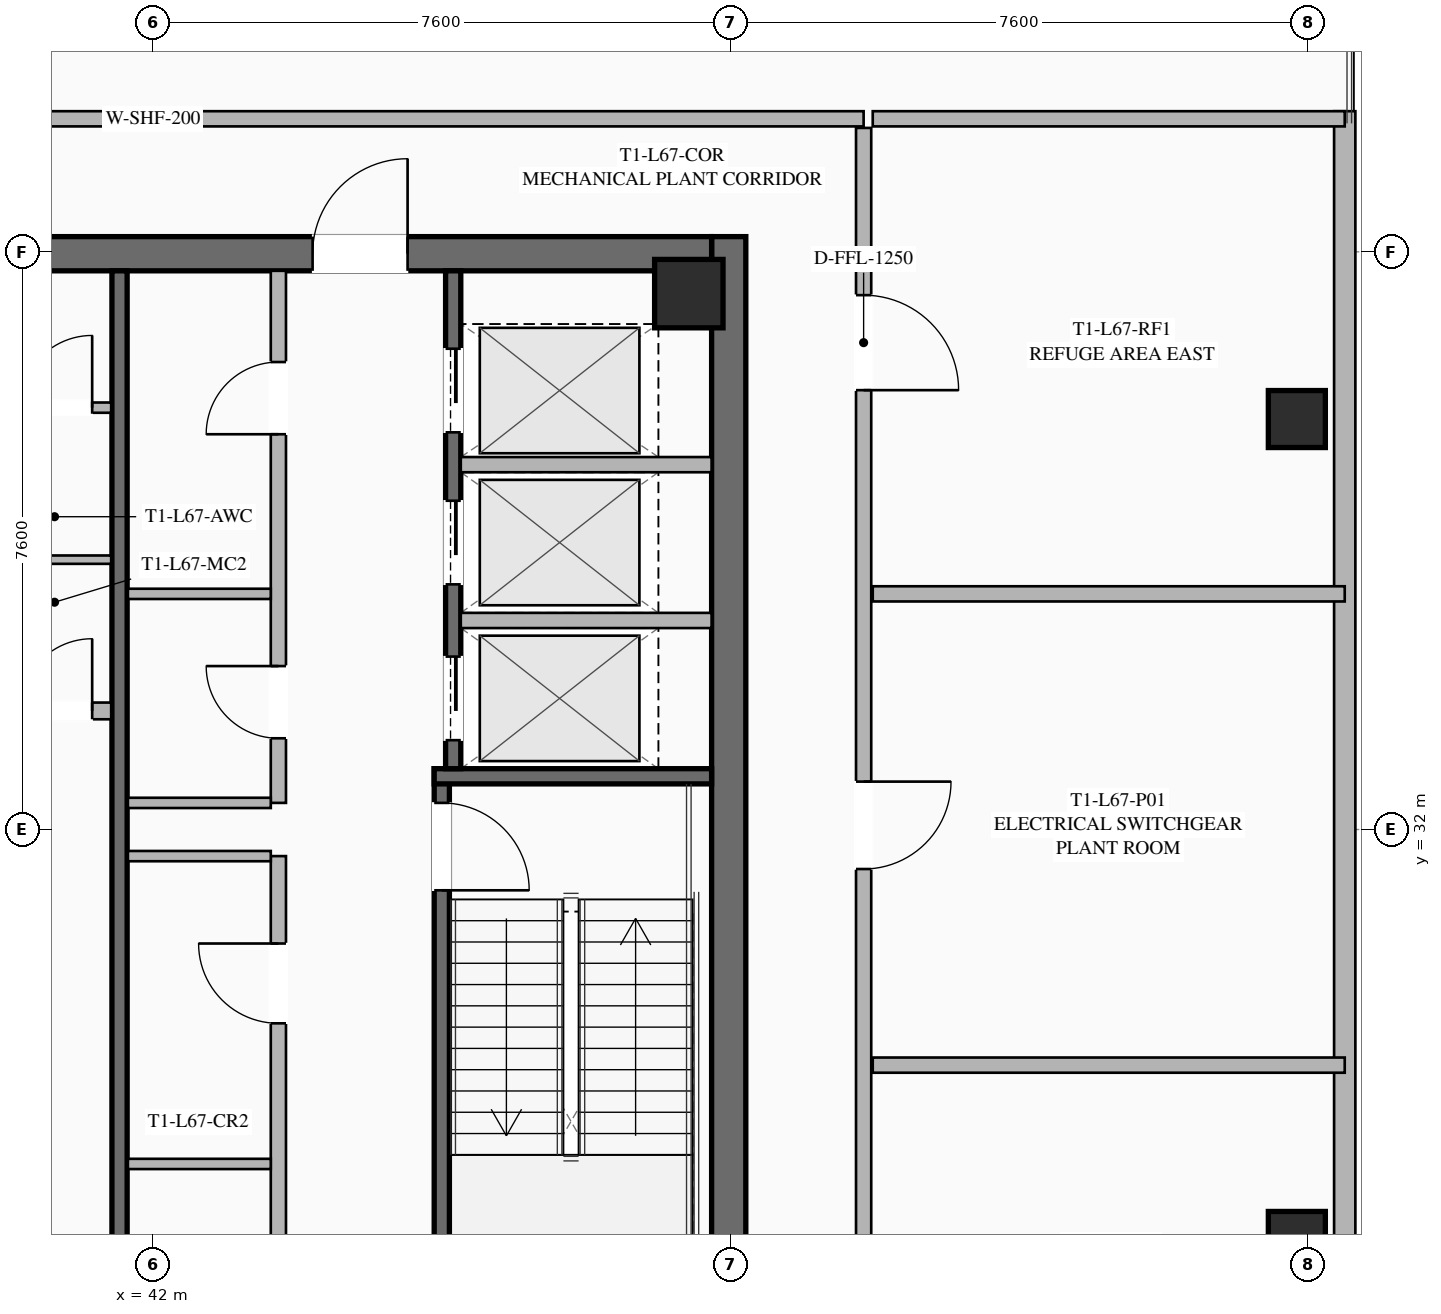
"""IFC4 building model, lengths in metres.
Left out: names, types, materials, properties, quantities, classifications, styles, units other than length and angle.
Written with IfcOpenShell. Run it as: python <this file> out.ifc"""

import sys

from ifc_helpers import new_model, si_unit, direction, frame, frame_2d, origin, origin_2d, place, context, subcontext, project, spatial, rectangle, hollow_rectangle, extrude, element, fill, save


model = new_model("IFC4")
c1 = context("Model", 3, precision=1e-05, world=origin(), true_north=direction((0.0, 1.0)))
c2 = subcontext(c1, "Body", "Model", "MODEL_VIEW")
j1 = project(units=[si_unit("LENGTHUNIT", "METRE"), si_unit("PLANEANGLEUNIT", "RADIAN")], contexts=[c1])
p1 = place(None, origin())
s1 = spatial("IfcSite", under=j1, at=p1, CompositionType="ELEMENT")
p2 = place(p1, origin())
s2 = spatial("IfcBuilding", under=s1, at=p2, CompositionType="ELEMENT")
p3 = place(p2, frame((0.0, 0.0, 246.8)))
s3 = spatial("IfcBuildingStorey", under=s2, at=p3, CompositionType="ELEMENT", Elevation=246.8)
p4 = place(p3, frame((49.575, 39.8, 0.0), z_axis=(0.0, 0.0, 1.0), x_axis=(0.0, -1.0, 0.0)))
e1 = element("IfcWall", 1, at=p4, inside=s3, PredefinedType="SHEAR", context=c2, shape_type="SweptSolid", body=[
    extrude(rectangle(XDim=15.6, YDim=0.45, at=frame_2d((7.8, 0.0))), origin(), (0.0, 0.0, 1.0), 4.6),
])
p5 = place(p3, frame((34.65, 39.575, 0.0), z_axis=(0.0, 0.0, 1.0), x_axis=(1.0, 0.0, 0.0)))
e2 = element("IfcWall", 2, at=p5, inside=s3, PredefinedType="SHEAR", context=c2, shape_type="SweptSolid", body=[
    extrude(rectangle(XDim=14.7, YDim=0.45, at=frame_2d((7.35, 0.0))), origin(), (0.0, 0.0, 1.0), 4.6),
])
p6 = place(p5, frame((4.4, 0.0, 0.0)))
e3 = element("IfcOpeningElement", 3, at=p6, cuts=e2, PredefinedType="OPENING", context=c2, shape_type="SweptSolid", body=[
    extrude(rectangle(XDim=1.25, YDim=2.25, at=frame_2d((0.625, 1.125))), frame((0.0, 0.235, 0.0), z_axis=(0.0, -1.0, 0.0), x_axis=(1.0, 0.0, 0.0)), (0.0, 0.0, 1.0), 0.47),
])
p7 = place(p5, frame((9.45, 0.0, 0.0)))
e4 = element("IfcOpeningElement", 4, at=p7, cuts=e2, PredefinedType="OPENING", context=c2, shape_type="SweptSolid", body=[
    extrude(rectangle(XDim=1.25, YDim=2.25, at=frame_2d((0.625, 1.125))), frame((0.0, 0.235, 0.0), z_axis=(0.0, -1.0, 0.0), x_axis=(1.0, 0.0, 0.0)), (0.0, 0.0, 1.0), 0.47),
])
p8 = place(p3, frame((49.05, 39.05, 0.0), z_axis=(0.0, 0.0, 1.0), x_axis=(1.0, 0.0, 0.0)))
e5 = element("IfcColumn", 5, at=p8, inside=s3, PredefinedType="COLUMN", context=c2, shape_type="SweptSolid", body=[
    extrude(hollow_rectangle(XDim=0.9, YDim=0.9, WallThickness=0.04, at=origin_2d()), origin(), (0.0, 0.0, 1.0), 4.38),
])
for number, where, z_axis, x_axis in (
    (6, (57.05, 26.6, 0.0), (0.0, 0.0, 1.0), (1.0, 0.0, 0.0)),
    (7, (57.05, 37.4, 0.0), (0.0, 0.0, 1.0), (1.0, 0.0, 0.0)),
):
    element("IfcColumn", number, at=place(p3, frame(where, z_axis=z_axis, x_axis=x_axis)), inside=s3, PredefinedType="COLUMN", context=c2, shape_type="SweptSolid", body=[
        extrude(hollow_rectangle(XDim=0.75, YDim=0.75, WallThickness=0.032, at=origin_2d()), origin(), (0.0, 0.0, 1.0), 4.38),
    ])
p9 = place(p3, frame((57.68, 41.45, 0.0), z_axis=(0.0, 0.0, 1.0), x_axis=(0.0, -1.0, 0.0)))
e8 = element("IfcWall", 8, at=p9, inside=s3, PredefinedType="SOLIDWALL", context=c2, shape_type="SweptSolid", body=[
    extrude(rectangle(XDim=18.9, YDim=0.28, at=frame_2d((9.45, 0.0))), origin(), (0.0, 0.0, 1.0), 4.38),
])
p10 = place(p3, frame((45.8, 32.8, 0.0), z_axis=(0.0, 0.0, 1.0), x_axis=(0.0, -1.0, 0.0)))
e9 = element("IfcWall", 9, at=p10, inside=s3, PredefinedType="SHEAR", context=c2, shape_type="SweptSolid", body=[
    extrude(rectangle(XDim=8.15, YDim=0.2, at=frame_2d((4.075, 0.0))), origin(), (0.0, 0.0, 1.0), 4.38),
])
p11 = place(p10, frame((0.45, 0.0, 0.0)))
e10 = element("IfcOpeningElement", 10, at=p11, cuts=e9, PredefinedType="OPENING", context=c2, shape_type="SweptSolid", body=[
    extrude(rectangle(XDim=1.15, YDim=2.2, at=frame_2d((0.575, 1.1))), frame((0.0, 0.11, 0.0), z_axis=(0.0, -1.0, 0.0), x_axis=(1.0, 0.0, 0.0)), (0.0, 0.0, 1.0), 0.22),
])
p12 = place(p3, frame((45.7, 32.7, 0.0), z_axis=(0.0, 0.0, 1.0), x_axis=(1.0, 0.0, 0.0)))
e11 = element("IfcWall", 11, at=p12, inside=s3, PredefinedType="SHEAR", context=c2, shape_type="SweptSolid", body=[
    extrude(rectangle(XDim=3.65, YDim=0.2, at=frame_2d((1.825, 0.0))), origin(), (0.0, 0.0, 1.0), 4.38),
])
p13 = place(p3, frame((41.56, 24.65, 0.0), z_axis=(0.0, 0.0, 1.0), x_axis=(0.0, 1.0, 0.0)))
e12 = element("IfcWall", 12, at=p13, inside=s3, PredefinedType="SHEAR", context=c2, shape_type="SweptSolid", body=[
    extrude(rectangle(XDim=14.7, YDim=0.2, at=frame_2d((7.35, 0.0))), origin(), (0.0, 0.0, 1.0), 4.38),
])
p14 = place(p3, frame((38.3, 33.56, 0.0), z_axis=(0.0, 0.0, 1.0), x_axis=(1.0, 0.0, 0.0)))
e13 = element("IfcWall", 13, at=p14, inside=s3, PredefinedType="SOLIDWALL", context=c2, shape_type="SweptSolid", body=[
    extrude(rectangle(XDim=3.15, YDim=0.22, at=frame_2d((1.575, 0.0))), origin(), (0.0, 0.0, 1.0), 3.491),
])
p15 = place(p14, frame((0.25, 0.0, 0.0)))
e14 = element("IfcOpeningElement", 14, at=p15, cuts=e13, PredefinedType="OPENING", context=c2, shape_type="SweptSolid", body=[
    extrude(rectangle(XDim=0.95, YDim=2.05, at=frame_2d((0.475, 1.025))), frame((0.0, 0.12, 0.0), z_axis=(0.0, -1.0, 0.0), x_axis=(1.0, 0.0, 0.0)), (0.0, 0.0, 1.0), 0.24),
])
p16 = place(p14, frame((1.95, 0.0, 0.0)))
e15 = element("IfcOpeningElement", 15, at=p16, cuts=e13, PredefinedType="OPENING", context=c2, shape_type="SweptSolid", body=[
    extrude(rectangle(XDim=0.95, YDim=2.05, at=frame_2d((0.475, 1.025))), frame((0.0, 0.12, 0.0), z_axis=(0.0, -1.0, 0.0), x_axis=(1.0, 0.0, 0.0)), (0.0, 0.0, 1.0), 0.24),
])
p17 = place(p3, frame((45.95, 39.35, 0.0), z_axis=(0.0, 0.0, 1.0), x_axis=(0.0, -1.0, 0.0)))
e16 = element("IfcWall", 16, at=p17, inside=s3, PredefinedType="SHEAR", context=c2, shape_type="SweptSolid", body=[
    extrude(rectangle(XDim=6.55, YDim=0.2, at=frame_2d((3.275, 0.0))), origin(), (0.0, 0.0, 1.0), 4.38),
])
p18 = place(p17, frame((5.075, 0.0, 0.0)))
e17 = element("IfcOpeningElement", 17, at=p18, cuts=e16, PredefinedType="OPENING", context=c2, shape_type="SweptSolid", body=[
    extrude(rectangle(XDim=1.1, YDim=2.2, at=frame_2d((0.55, 1.1))), frame((0.0, 0.11, 0.0), z_axis=(0.0, -1.0, 0.0), x_axis=(1.0, 0.0, 0.0)), (0.0, 0.0, 1.0), 0.22),
])
p19 = place(p17, frame((3.025, 0.0, 0.0)))
e18 = element("IfcOpeningElement", 18, at=p19, cuts=e16, PredefinedType="OPENING", context=c2, shape_type="SweptSolid", body=[
    extrude(rectangle(XDim=1.1, YDim=2.2, at=frame_2d((0.55, 1.1))), frame((0.0, 0.11, 0.0), z_axis=(0.0, -1.0, 0.0), x_axis=(1.0, 0.0, 0.0)), (0.0, 0.0, 1.0), 0.22),
])
p20 = place(p17, frame((1.025, 0.0, 0.0)))
e19 = element("IfcOpeningElement", 19, at=p20, cuts=e16, PredefinedType="OPENING", context=c2, shape_type="SweptSolid", body=[
    extrude(rectangle(XDim=1.1, YDim=2.2, at=frame_2d((0.55, 1.1))), frame((0.0, 0.11, 0.0), z_axis=(0.0, -1.0, 0.0), x_axis=(1.0, 0.0, 0.0)), (0.0, 0.0, 1.0), 0.22),
])
for number, where, z_axis, x_axis in (
    (20, (46.05, 34.75, 0.0), (0.0, 0.0, 1.0), (1.0, 0.0, 0.0)),
    (21, (46.05, 36.8, 0.0), (0.0, 0.0, 1.0), (1.0, 0.0, 0.0)),
):
    element("IfcWall", number, at=place(p3, frame(where, z_axis=z_axis, x_axis=x_axis)), inside=s3, PredefinedType="SOLIDWALL", context=c2, shape_type="SweptSolid", body=[
        extrude(rectangle(XDim=3.3, YDim=0.2, at=frame_2d((1.65, 0.0))), origin(), (0.0, 0.0, 1.0), 4.38),
    ])
p21 = place(p3, frame((38.3, 37.55, 0.0), z_axis=(0.0, 0.0, 1.0), x_axis=(1.0, 0.0, 0.0)))
e22 = element("IfcWall", 22, at=p21, inside=s3, PredefinedType="PARTITIONING", context=c2, shape_type="SweptSolid", body=[
    extrude(rectangle(XDim=3.15, YDim=0.135, at=frame_2d((1.575, 0.0))), origin(), (0.0, 0.0, 1.0), 3.491),
])
p22 = place(p21, frame((0.25, 0.0, 0.0)))
e23 = element("IfcOpeningElement", 23, at=p22, cuts=e22, PredefinedType="OPENING", context=c2, shape_type="SweptSolid", body=[
    extrude(rectangle(XDim=0.95, YDim=2.05, at=frame_2d((0.475, 1.025))), frame((0.0, 0.077, 0.0), z_axis=(0.0, -1.0, 0.0), x_axis=(1.0, 0.0, 0.0)), (0.0, 0.0, 1.0), 0.155),
])
p23 = place(p21, frame((1.95, 0.0, 0.0)))
e24 = element("IfcOpeningElement", 24, at=p23, cuts=e22, PredefinedType="OPENING", context=c2, shape_type="SweptSolid", body=[
    extrude(rectangle(XDim=0.95, YDim=2.05, at=frame_2d((0.475, 1.025))), frame((0.0, 0.077, 0.0), z_axis=(0.0, -1.0, 0.0), x_axis=(1.0, 0.0, 0.0)), (0.0, 0.0, 1.0), 0.155),
])
p24 = place(p3, frame((38.3, 35.55, 0.0), z_axis=(0.0, 0.0, 1.0), x_axis=(1.0, 0.0, 0.0)))
e25 = element("IfcWall", 25, at=p24, inside=s3, PredefinedType="PARTITIONING", context=c2, shape_type="SweptSolid", body=[
    extrude(rectangle(XDim=3.15, YDim=0.11, at=frame_2d((1.575, 0.0))), origin(), (0.0, 0.0, 1.0), 3.491),
])
p25 = place(p3, frame((43.65, 24.65, 0.0), z_axis=(0.0, 0.0, 1.0), x_axis=(0.0, 1.0, 0.0)))
e26 = element("IfcWall", 26, at=p25, inside=s3, PredefinedType="SOLIDWALL", context=c2, shape_type="SweptSolid", body=[
    extrude(rectangle(XDim=7.0, YDim=0.2, at=frame_2d((3.5, 0.0))), origin(), (0.0, 0.0, 1.0), 3.491),
])
p26 = place(p25, frame((0.85, 0.0, 0.0)))
e27 = element("IfcOpeningElement", 27, at=p26, cuts=e26, PredefinedType="OPENING", context=c2, shape_type="SweptSolid", body=[
    extrude(rectangle(XDim=0.95, YDim=2.05, at=frame_2d((0.475, 1.025))), frame((0.0, 0.11, 0.0), z_axis=(0.0, -1.0, 0.0), x_axis=(1.0, 0.0, 0.0)), (0.0, 0.0, 1.0), 0.22),
])
p27 = place(p25, frame((4.8, 0.0, 0.0)))
e28 = element("IfcOpeningElement", 28, at=p27, cuts=e26, PredefinedType="OPENING", context=c2, shape_type="SweptSolid", body=[
    extrude(rectangle(XDim=1.05, YDim=2.2, at=frame_2d((0.525, 1.1))), frame((0.0, 0.11, 0.0), z_axis=(0.0, -1.0, 0.0), x_axis=(1.0, 0.0, 0.0)), (0.0, 0.0, 1.0), 0.22),
])
for number, where, z_axis, x_axis in (
    (29, (41.67, 31.65, 0.0), (0.0, 0.0, 1.0), (1.0, 0.0, 0.0)),
    (30, (41.67, 27.6, 0.0), (0.0, 0.0, 1.0), (1.0, 0.0, 0.0)),
):
    element("IfcWall", number, at=place(p3, frame(where, z_axis=z_axis, x_axis=x_axis)), inside=s3, PredefinedType="PARTITIONING", context=c2, shape_type="SweptSolid", body=[
        extrude(rectangle(XDim=1.88, YDim=0.135, at=frame_2d((0.94, 0.0))), origin(), (0.0, 0.0, 1.0), 3.491),
    ])
p28 = place(p3, frame((43.65, 32.35, 0.0), z_axis=(0.0, 0.0, 1.0), x_axis=(0.0, 1.0, 0.0)))
e31 = element("IfcWall", 31, at=p28, inside=s3, PredefinedType="SOLIDWALL", context=c2, shape_type="SweptSolid", body=[
    extrude(rectangle(XDim=7.0, YDim=0.2, at=frame_2d((3.5, 0.0))), origin(), (0.0, 0.0, 1.0), 3.491),
])
p29 = place(p28, frame((0.85, 0.0, 0.0)))
e32 = element("IfcOpeningElement", 32, at=p29, cuts=e31, PredefinedType="OPENING", context=c2, shape_type="SweptSolid", body=[
    extrude(rectangle(XDim=0.95, YDim=2.05, at=frame_2d((0.475, 1.025))), frame((0.0, 0.11, 0.0), z_axis=(0.0, -1.0, 0.0), x_axis=(1.0, 0.0, 0.0)), (0.0, 0.0, 1.0), 0.22),
])
p30 = place(p28, frame((4.85, 0.0, 0.0)))
e33 = element("IfcOpeningElement", 33, at=p30, cuts=e31, PredefinedType="OPENING", context=c2, shape_type="SweptSolid", body=[
    extrude(rectangle(XDim=0.95, YDim=2.05, at=frame_2d((0.475, 1.025))), frame((0.0, 0.11, 0.0), z_axis=(0.0, -1.0, 0.0), x_axis=(1.0, 0.0, 0.0)), (0.0, 0.0, 1.0), 0.22),
])
for number, where, z_axis, x_axis in (
    (34, (41.67, 32.35, 0.0), (0.0, 0.0, 1.0), (1.0, 0.0, 0.0)),
    (35, (41.67, 35.1, 0.0), (0.0, 0.0, 1.0), (1.0, 0.0, 0.0)),
):
    element("IfcWall", number, at=place(p3, frame(where, z_axis=z_axis, x_axis=x_axis)), inside=s3, PredefinedType="PARTITIONING", context=c2, shape_type="SweptSolid", body=[
        extrude(rectangle(XDim=1.88, YDim=0.135, at=frame_2d((0.94, 0.0))), origin(), (0.0, 0.0, 1.0), 3.491),
    ])
p31 = place(p3, frame((32.65, 41.35, 0.0), z_axis=(0.0, 0.0, 1.0), x_axis=(1.0, 0.0, 0.0)))
e36 = element("IfcWall", 36, at=p31, inside=s3, PredefinedType="SOLIDWALL", context=c2, shape_type="SweptSolid", body=[
    extrude(rectangle(XDim=18.7, YDim=0.2, at=frame_2d((9.35, 0.0))), origin(), (0.0, 0.0, 1.0), 3.491),
])
p32 = place(p3, frame((51.35, 41.23, 0.0), z_axis=(0.0, 0.0, 1.0), x_axis=(0.0, -1.0, 0.0)))
e37 = element("IfcWall", 37, at=p32, inside=s3, PredefinedType="SOLIDWALL", context=c2, shape_type="SweptSolid", body=[
    extrude(rectangle(XDim=18.46, YDim=0.2, at=frame_2d((9.23, 0.0))), origin(), (0.0, 0.0, 1.0), 3.491),
])
p33 = place(p32, frame((2.2, 0.0, 0.0)))
e38 = element("IfcOpeningElement", 38, at=p33, cuts=e37, PredefinedType="OPENING", context=c2, shape_type="SweptSolid", body=[
    extrude(rectangle(XDim=1.25, YDim=2.25, at=frame_2d((0.625, 1.125))), frame((0.0, 0.11, 0.0), z_axis=(0.0, -1.0, 0.0), x_axis=(1.0, 0.0, 0.0)), (0.0, 0.0, 1.0), 0.22),
])
p34 = place(p32, frame((8.6, 0.0, 0.0)))
e39 = element("IfcOpeningElement", 39, at=p34, cuts=e37, PredefinedType="OPENING", context=c2, shape_type="SweptSolid", body=[
    extrude(rectangle(XDim=1.15, YDim=2.2, at=frame_2d((0.575, 1.1))), frame((0.0, 0.11, 0.0), z_axis=(0.0, -1.0, 0.0), x_axis=(1.0, 0.0, 0.0)), (0.0, 0.0, 1.0), 0.22),
])
p35 = place(p32, frame((16.0, 0.0, 0.0)))
e40 = element("IfcOpeningElement", 40, at=p35, cuts=e37, PredefinedType="OPENING", context=c2, shape_type="SweptSolid", body=[
    extrude(rectangle(XDim=1.15, YDim=2.2, at=frame_2d((0.575, 1.1))), frame((0.0, 0.11, 0.0), z_axis=(0.0, -1.0, 0.0), x_axis=(1.0, 0.0, 0.0)), (0.0, 0.0, 1.0), 0.22),
])
for number, where, z_axis, x_axis in (
    (41, (51.47, 41.35, 0.0), (0.0, 0.0, 1.0), (1.0, 0.0, 0.0)),
    (42, (51.47, 35.1, 0.0), (0.0, 0.0, 1.0), (1.0, 0.0, 0.0)),
    (43, (51.47, 28.9, 0.0), (0.0, 0.0, 1.0), (1.0, 0.0, 0.0)),
):
    element("IfcWall", number, at=place(p3, frame(where, z_axis=z_axis, x_axis=x_axis)), inside=s3, PredefinedType="SOLIDWALL", context=c2, shape_type="SweptSolid", body=[
        extrude(rectangle(XDim=6.21, YDim=0.2, at=frame_2d((3.105, 0.0))), origin(), (0.0, 0.0, 1.0), 3.491),
    ])
p36 = place(p7, origin())
e44 = element("IfcDoor", 44, at=p36, inside=s3, OperationType="SINGLE_SWING_RIGHT", PredefinedType="DOOR", context=c2, shape_type="SweptSolid", body=[
    extrude(rectangle(XDim=1.25, YDim=2.25, at=frame_2d((0.625, 1.125))), frame((0.0, 0.025, 0.0), z_axis=(0.0, -1.0, 0.0), x_axis=(1.0, 0.0, 0.0)), (0.0, 0.0, 1.0), 0.05),
])
fill(e4, e44)
p37 = place(p11, origin())
e45 = element("IfcDoor", 45, at=p37, inside=s3, OperationType="SINGLE_SWING_RIGHT", PredefinedType="DOOR", context=c2, shape_type="SweptSolid", body=[
    extrude(rectangle(XDim=1.15, YDim=2.2, at=frame_2d((0.575, 1.1))), frame((0.0, 0.025, 0.0), z_axis=(0.0, -1.0, 0.0), x_axis=(1.0, 0.0, 0.0)), (0.0, 0.0, 1.0), 0.05),
])
fill(e10, e45)
p38 = place(p23, origin())
e46 = element("IfcDoor", 46, at=p38, inside=s3, OperationType="SINGLE_SWING_RIGHT", PredefinedType="DOOR", context=c2, shape_type="SweptSolid", body=[
    extrude(rectangle(XDim=0.95, YDim=2.05, at=frame_2d((0.475, 1.025))), frame((0.0, 0.025, 0.0), z_axis=(0.0, -1.0, 0.0), x_axis=(1.0, 0.0, 0.0)), (0.0, 0.0, 1.0), 0.05),
])
fill(e24, e46)
p39 = place(p16, origin())
e47 = element("IfcDoor", 47, at=p39, inside=s3, OperationType="SINGLE_SWING_RIGHT", PredefinedType="DOOR", context=c2, shape_type="SweptSolid", body=[
    extrude(rectangle(XDim=0.95, YDim=2.05, at=frame_2d((0.475, 1.025))), frame((0.0, 0.025, 0.0), z_axis=(0.0, -1.0, 0.0), x_axis=(1.0, 0.0, 0.0)), (0.0, 0.0, 1.0), 0.05),
])
fill(e15, e47)
p40 = place(p27, origin())
e48 = element("IfcDoor", 48, at=p40, inside=s3, OperationType="SINGLE_SWING_RIGHT", PredefinedType="DOOR", context=c2, shape_type="SweptSolid", body=[
    extrude(rectangle(XDim=1.05, YDim=2.2, at=frame_2d((0.525, 1.1))), frame((0.0, 0.025, 0.0), z_axis=(0.0, -1.0, 0.0), x_axis=(1.0, 0.0, 0.0)), (0.0, 0.0, 1.0), 0.05),
])
fill(e28, e48)
p41 = place(p29, origin())
e49 = element("IfcDoor", 49, at=p41, inside=s3, OperationType="SINGLE_SWING_RIGHT", PredefinedType="DOOR", context=c2, shape_type="SweptSolid", body=[
    extrude(rectangle(XDim=0.95, YDim=2.05, at=frame_2d((0.475, 1.025))), frame((0.0, 0.025, 0.0), z_axis=(0.0, -1.0, 0.0), x_axis=(1.0, 0.0, 0.0)), (0.0, 0.0, 1.0), 0.05),
])
fill(e32, e49)
p42 = place(p30, origin())
e50 = element("IfcDoor", 50, at=p42, inside=s3, OperationType="SINGLE_SWING_LEFT", PredefinedType="DOOR", context=c2, shape_type="SweptSolid", body=[
    extrude(rectangle(XDim=0.95, YDim=2.05, at=frame_2d((0.475, 1.025))), frame((0.0, 0.025, 0.0), z_axis=(0.0, -1.0, 0.0), x_axis=(1.0, 0.0, 0.0)), (0.0, 0.0, 1.0), 0.05),
])
fill(e33, e50)
p43 = place(p33, origin())
e51 = element("IfcDoor", 51, at=p43, inside=s3, OperationType="SINGLE_SWING_RIGHT", PredefinedType="DOOR", context=c2, shape_type="SweptSolid", body=[
    extrude(rectangle(XDim=1.25, YDim=2.25, at=frame_2d((0.625, 1.125))), frame((0.0, 0.025, 0.0), z_axis=(0.0, -1.0, 0.0), x_axis=(1.0, 0.0, 0.0)), (0.0, 0.0, 1.0), 0.05),
])
fill(e38, e51)
p44 = place(p34, origin())
e52 = element("IfcDoor", 52, at=p44, inside=s3, OperationType="SINGLE_SWING_LEFT", PredefinedType="DOOR", context=c2, shape_type="SweptSolid", body=[
    extrude(rectangle(XDim=1.15, YDim=2.2, at=frame_2d((0.575, 1.1))), frame((0.0, 0.025, 0.0), z_axis=(0.0, -1.0, 0.0), x_axis=(1.0, 0.0, 0.0)), (0.0, 0.0, 1.0), 0.05),
])
fill(e39, e52)
p45 = place(p18, origin())
e53 = element("IfcDoor", 53, at=p45, inside=s3, OperationType="SLIDING_TO_LEFT", PredefinedType="DOOR", context=c2, shape_type="SweptSolid", body=[
    extrude(rectangle(XDim=1.1, YDim=2.2, at=frame_2d((0.55, 1.1))), frame((0.0, 0.025, 0.0), z_axis=(0.0, -1.0, 0.0), x_axis=(1.0, 0.0, 0.0)), (0.0, 0.0, 1.0), 0.05),
])
fill(e17, e53)
p46 = place(p19, origin())
e54 = element("IfcDoor", 54, at=p46, inside=s3, OperationType="SLIDING_TO_LEFT", PredefinedType="DOOR", context=c2, shape_type="SweptSolid", body=[
    extrude(rectangle(XDim=1.1, YDim=2.2, at=frame_2d((0.55, 1.1))), frame((0.0, 0.025, 0.0), z_axis=(0.0, -1.0, 0.0), x_axis=(1.0, 0.0, 0.0)), (0.0, 0.0, 1.0), 0.05),
])
fill(e18, e54)
p47 = place(p20, origin())
e55 = element("IfcDoor", 55, at=p47, inside=s3, OperationType="SLIDING_TO_LEFT", PredefinedType="DOOR", context=c2, shape_type="SweptSolid", body=[
    extrude(rectangle(XDim=1.1, YDim=2.2, at=frame_2d((0.55, 1.1))), frame((0.0, 0.025, 0.0), z_axis=(0.0, -1.0, 0.0), x_axis=(1.0, 0.0, 0.0)), (0.0, 0.0, 1.0), 0.05),
])
fill(e19, e55)
save(model, sys.argv[1])
